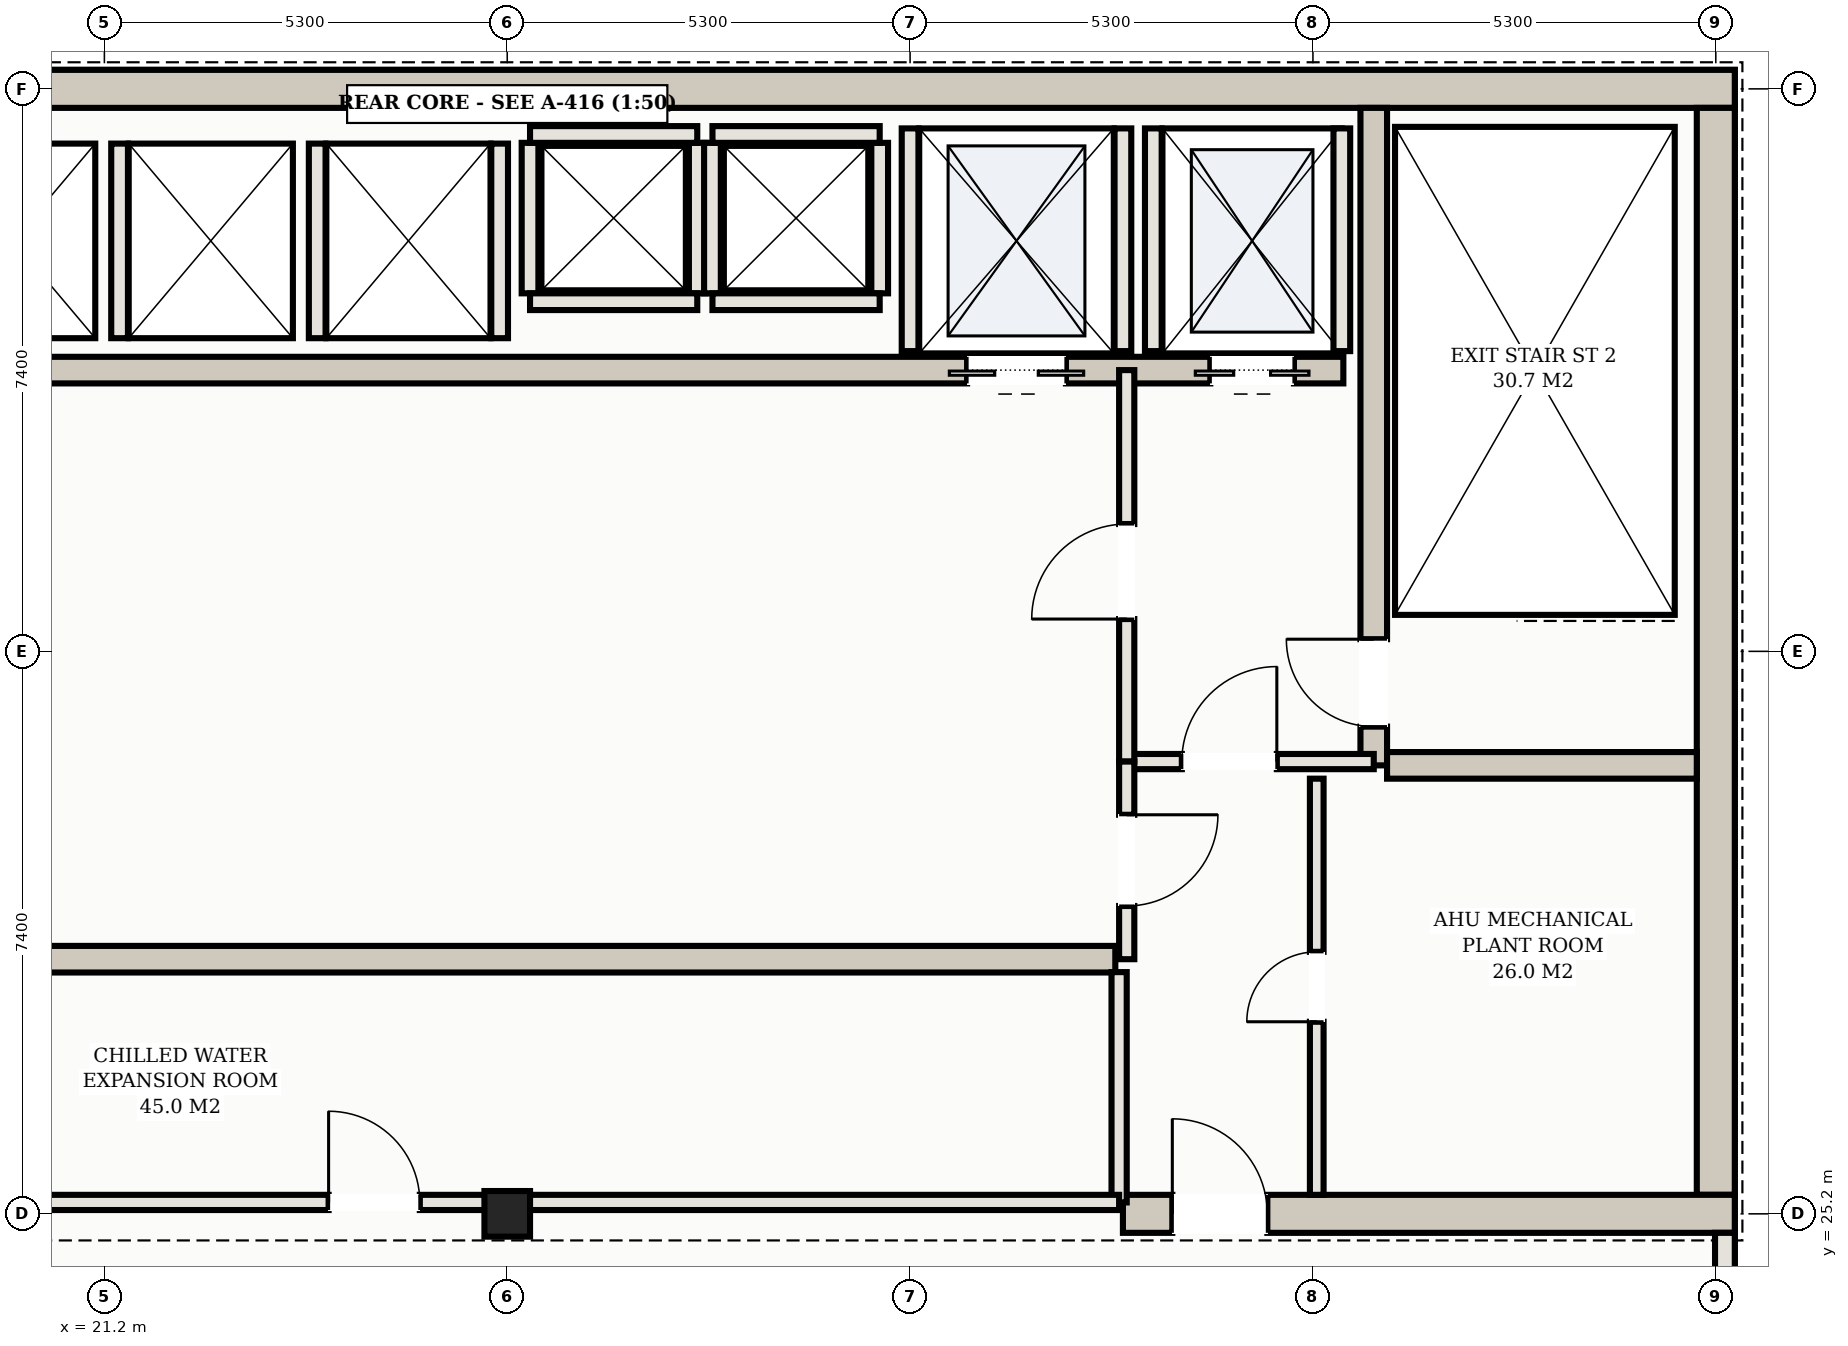
"""IFC4 building model, lengths in metres.
Left out: names, types, materials, properties, quantities, classifications, styles, units other than length and angle.
Written with IfcOpenShell. Run it as: python <this file> out.ifc"""

import sys

from ifc_helpers import new_model, si_unit, direction, frame, frame_2d, origin, origin_2d, place, context, subcontext, project, spatial, rectangle, hollow_rectangle, extrude, element, fill, save


model = new_model("IFC4")
c1 = context("Model", 3, precision=1e-05, world=origin(), true_north=direction((0.0, 1.0)))
c2 = subcontext(c1, "Body", "Model", "MODEL_VIEW")
j1 = project(units=[si_unit("LENGTHUNIT", "METRE"), si_unit("PLANEANGLEUNIT", "RADIAN")], contexts=[c1])
p1 = place(None, origin())
s1 = spatial("IfcSite", under=j1, at=p1, CompositionType="ELEMENT")
p2 = place(p1, origin())
s2 = spatial("IfcBuilding", under=s1, at=p2, CompositionType="ELEMENT")
p3 = place(p2, frame((0.0, 0.0, 270.8)))
s3 = spatial("IfcBuildingStorey", under=s2, at=p3, CompositionType="ELEMENT", Elevation=270.8)
p4 = place(p3, frame((10.35, 40.0, 0.0), z_axis=(0.0, 0.0, 1.0), x_axis=(1.0, 0.0, 0.0)))
e1 = element("IfcWall", 1, at=p4, inside=s3, PredefinedType="SHEAR", context=c2, shape_type="SweptSolid", body=[
    extrude(rectangle(XDim=32.3, YDim=0.5, at=frame_2d((16.15, 0.0))), origin(), (0.0, 0.0, 1.0), 6.177),
])
p5 = place(p3, frame((42.4, 25.45, 0.0), z_axis=(0.0, 0.0, 1.0), x_axis=(0.0, 1.0, 0.0)))
e2 = element("IfcWall", 2, at=p5, inside=s3, PredefinedType="SHEAR", context=c2, shape_type="SweptSolid", body=[
    extrude(rectangle(XDim=14.3, YDim=0.5, at=frame_2d((7.15, 0.0))), origin(), (0.0, 0.0, 1.0), 14.168),
])
p6 = place(p3, frame((34.6, 25.2, 0.0), z_axis=(0.0, 0.0, 1.0), x_axis=(1.0, 0.0, 0.0)))
e3 = element("IfcWall", 3, at=p6, inside=s3, PredefinedType="SHEAR", context=c2, shape_type="SweptSolid", body=[
    extrude(rectangle(XDim=8.05, YDim=0.5, at=frame_2d((4.025, 0.0))), origin(), (0.0, 0.0, 1.0), 12.223),
])
p7 = place(p6, frame((0.65, 0.0, 0.0)))
e4 = element("IfcOpeningElement", 4, at=p7, cuts=e3, PredefinedType="OPENING", context=c2, shape_type="SweptSolid", body=[
    extrude(rectangle(XDim=1.25, YDim=2.2, at=frame_2d((0.625, 1.1))), frame((0.0, 0.26, 0.0), z_axis=(0.0, -1.0, 0.0), x_axis=(1.0, 0.0, 0.0)), (0.0, 0.0, 1.0), 0.52),
])
p8 = place(p3, frame((37.9, 31.1, 0.0), z_axis=(0.0, 0.0, 1.0), x_axis=(0.0, 1.0, 0.0)))
e5 = element("IfcWall", 5, at=p8, inside=s3, PredefinedType="SHEAR", context=c2, shape_type="SweptSolid", body=[
    extrude(rectangle(XDim=8.65, YDim=0.35, at=frame_2d((4.325, 0.0))), origin(), (0.0, 0.0, 1.0), 13.046),
])
p9 = place(p8, frame((0.51, 0.0, 0.0)))
e6 = element("IfcOpeningElement", 6, at=p9, cuts=e5, PredefinedType="OPENING", context=c2, shape_type="SweptSolid", body=[
    extrude(rectangle(XDim=1.15, YDim=2.2, at=frame_2d((0.575, 1.1))), frame((0.0, 0.185, 0.0), z_axis=(0.0, -1.0, 0.0), x_axis=(1.0, 0.0, 0.0)), (0.0, 0.0, 1.0), 0.37),
])
p10 = place(p3, frame((38.075, 31.1, 0.0), z_axis=(0.0, 0.0, 1.0), x_axis=(1.0, 0.0, 0.0)))
e7 = element("IfcWall", 7, at=p10, inside=s3, PredefinedType="SHEAR", context=c2, shape_type="SweptSolid", body=[
    extrude(rectangle(XDim=4.075, YDim=0.35, at=frame_2d((2.038, 0.0))), origin(), (0.0, 0.0, 1.0), 13.09),
])
p11 = place(p3, frame((15.5, 36.3, 0.0), z_axis=(0.0, 0.0, 1.0), x_axis=(1.0, 0.0, 0.0)))
e8 = element("IfcWall", 8, at=p11, inside=s3, PredefinedType="SHEAR", context=c2, shape_type="SweptSolid", body=[
    extrude(rectangle(XDim=22.0, YDim=0.35, at=frame_2d((11.0, 0.0))), origin(), (0.0, 0.0, 1.0), 7.461),
])
p12 = place(p11, frame((0.65, 0.0, 0.0)))
e9 = element("IfcOpeningElement", 9, at=p12, cuts=e8, PredefinedType="OPENING", context=c2, shape_type="SweptSolid", body=[
    extrude(rectangle(XDim=1.1, YDim=2.15, at=frame_2d((0.55, 1.075))), frame((0.0, 0.185, 0.0), z_axis=(0.0, -1.0, 0.0), x_axis=(1.0, 0.0, 0.0)), (0.0, 0.0, 1.0), 0.37),
])
p13 = place(p11, frame((20.25, 0.0, 0.0)))
e10 = element("IfcOpeningElement", 10, at=p13, cuts=e8, PredefinedType="OPENING", context=c2, shape_type="SweptSolid", body=[
    extrude(rectangle(XDim=1.1, YDim=2.15, at=frame_2d((0.55, 1.075))), frame((0.0, 0.185, 0.0), z_axis=(0.0, -1.0, 0.0), x_axis=(1.0, 0.0, 0.0)), (0.0, 0.0, 1.0), 0.37),
])
p14 = place(p11, frame((17.05, 0.0, 0.0)))
e11 = element("IfcOpeningElement", 11, at=p14, cuts=e8, PredefinedType="OPENING", context=c2, shape_type="SweptSolid", body=[
    extrude(rectangle(XDim=1.3, YDim=2.2, at=frame_2d((0.65, 1.1))), frame((0.0, 0.185, 0.0), z_axis=(0.0, -1.0, 0.0), x_axis=(1.0, 0.0, 0.0)), (0.0, 0.0, 1.0), 0.37),
])
p15 = place(p3, frame((18.5, 28.55, 0.0), z_axis=(0.0, 0.0, 1.0), x_axis=(1.0, 0.0, 0.0)))
e12 = element("IfcWall", 12, at=p15, inside=s3, PredefinedType="SHEAR", context=c2, shape_type="SweptSolid", body=[
    extrude(rectangle(XDim=16.0, YDim=0.35, at=frame_2d((8.0, 0.0))), origin(), (0.0, 0.0, 1.0), 8.209),
])
p16 = place(p3, frame((26.5, 25.2, 0.0), z_axis=(0.0, 0.0, 1.0), x_axis=(1.0, 0.0, 0.0)))
e13 = element("IfcColumn", 13, at=p16, inside=s3, PredefinedType="COLUMN", context=c2, shape_type="SweptSolid", body=[
    extrude(hollow_rectangle(XDim=0.6, YDim=0.6, WallThickness=0.022, at=origin_2d()), origin(), (0.0, 0.0, 1.0), 6.0),
])
for number, where, z_axis, x_axis in (
    (14, (35.0, 36.55, 0.0), (0.0, 0.0, 1.0), (0.0, 1.0, 0.0)),
    (15, (37.48, 36.55, 0.0), (0.0, 0.0, 1.0), (0.0, 1.0, 0.0)),
):
    element("IfcWall", number, at=place(p3, frame(where, z_axis=z_axis, x_axis=x_axis)), inside=s3, PredefinedType="SOLIDWALL", context=c2, shape_type="SweptSolid", body=[
        extrude(rectangle(XDim=2.93, YDim=0.22, at=frame_2d((1.465, 0.0))), origin(), (0.0, 0.0, 1.0), 12.262),
    ])
for number, where, z_axis, x_axis in (
    (16, (31.8, 36.55, 0.0), (0.0, 0.0, 1.0), (0.0, 1.0, 0.0)),
    (17, (34.6, 36.55, 0.0), (0.0, 0.0, 1.0), (0.0, 1.0, 0.0)),
):
    element("IfcWall", number, at=place(p3, frame(where, z_axis=z_axis, x_axis=x_axis)), inside=s3, PredefinedType="SOLIDWALL", context=c2, shape_type="SweptSolid", body=[
        extrude(rectangle(XDim=2.93, YDim=0.22, at=frame_2d((1.465, 0.0))), origin(), (0.0, 0.0, 1.0), 11.464),
    ])
p17 = place(p3, frame((21.4, 36.72, 0.0), z_axis=(0.0, 0.0, 1.0), x_axis=(0.0, 1.0, 0.0)))
e18 = element("IfcWall", 18, at=p17, inside=s3, PredefinedType="SOLIDWALL", context=c2, shape_type="SweptSolid", body=[
    extrude(rectangle(XDim=2.56, YDim=0.22, at=frame_2d((1.28, 0.0))), origin(), (0.0, 0.0, 1.0), 8.871),
])
for number, where, z_axis, x_axis in (
    (19, (24.0, 36.72, 0.0), (0.0, 0.0, 1.0), (0.0, 1.0, 0.0)),
    (20, (26.4, 36.72, 0.0), (0.0, 0.0, 1.0), (0.0, 1.0, 0.0)),
):
    element("IfcWall", number, at=place(p3, frame(where, z_axis=z_axis, x_axis=x_axis)), inside=s3, PredefinedType="SOLIDWALL", context=c2, shape_type="SweptSolid", body=[
        extrude(rectangle(XDim=2.56, YDim=0.22, at=frame_2d((1.28, 0.0))), origin(), (0.0, 0.0, 1.0), 9.52),
    ])
for number, where, z_axis, x_axis in (
    (21, (26.8, 37.31, 0.0), (0.0, 0.0, 1.0), (0.0, 1.0, 0.0)),
    (22, (29.0, 37.31, 0.0), (0.0, 0.0, 1.0), (0.0, 1.0, 0.0)),
):
    element("IfcWall", number, at=place(p3, frame(where, z_axis=z_axis, x_axis=x_axis)), inside=s3, PredefinedType="SOLIDWALL", context=c2, shape_type="SweptSolid", body=[
        extrude(rectangle(XDim=1.98, YDim=0.22, at=frame_2d((0.99, 0.0))), origin(), (0.0, 0.0, 1.0), 10.218),
    ])
for number, where, z_axis, x_axis in (
    (23, (26.8, 39.4, 0.0), (0.0, 0.0, 1.0), (1.0, 0.0, 0.0)),
    (24, (26.8, 37.2, 0.0), (0.0, 0.0, 1.0), (1.0, 0.0, 0.0)),
):
    element("IfcWall", number, at=place(p3, frame(where, z_axis=z_axis, x_axis=x_axis)), inside=s3, PredefinedType="SOLIDWALL", context=c2, shape_type="SweptSolid", body=[
        extrude(rectangle(XDim=2.2, YDim=0.22, at=frame_2d((1.1, 0.0))), origin(), (0.0, 0.0, 1.0), 10.218),
    ])
for number, where, z_axis, x_axis in (
    (25, (29.2, 37.31, 0.0), (0.0, 0.0, 1.0), (0.0, 1.0, 0.0)),
    (26, (31.4, 37.31, 0.0), (0.0, 0.0, 1.0), (0.0, 1.0, 0.0)),
):
    element("IfcWall", number, at=place(p3, frame(where, z_axis=z_axis, x_axis=x_axis)), inside=s3, PredefinedType="SOLIDWALL", context=c2, shape_type="SweptSolid", body=[
        extrude(rectangle(XDim=1.98, YDim=0.22, at=frame_2d((0.99, 0.0))), origin(), (0.0, 0.0, 1.0), 10.816),
    ])
for number, where, z_axis, x_axis in (
    (27, (29.2, 39.4, 0.0), (0.0, 0.0, 1.0), (1.0, 0.0, 0.0)),
    (28, (29.2, 37.2, 0.0), (0.0, 0.0, 1.0), (1.0, 0.0, 0.0)),
):
    element("IfcWall", number, at=place(p3, frame(where, z_axis=z_axis, x_axis=x_axis)), inside=s3, PredefinedType="SOLIDWALL", context=c2, shape_type="SweptSolid", body=[
        extrude(rectangle(XDim=2.2, YDim=0.22, at=frame_2d((1.1, 0.0))), origin(), (0.0, 0.0, 1.0), 10.816),
    ])
p18 = place(p3, frame((42.52, 17.06, 0.0), z_axis=(0.0, 0.0, 1.0), x_axis=(0.0, 1.0, 0.0)))
e29 = element("IfcWall", 29, at=p18, inside=s3, PredefinedType="SOLIDWALL", context=c2, shape_type="SweptSolid", body=[
    extrude(rectangle(XDim=7.89, YDim=0.26, at=frame_2d((3.945, 0.0))), origin(), (0.0, 0.0, 1.0), 6.116),
])
p19 = place(p3, frame((34.65, 31.15, 0.0), z_axis=(0.0, 0.0, 1.0), x_axis=(1.0, 0.0, 0.0)))
e30 = element("IfcWall", 30, at=p19, inside=s3, PredefinedType="PARTITIONING", context=c2, shape_type="SweptSolid", body=[
    extrude(rectangle(XDim=3.25, YDim=0.2, at=frame_2d((1.625, 0.0))), origin(), (0.0, 0.0, 1.0), 5.98),
])
p20 = place(p19, frame((0.725, 0.0, 0.0)))
e31 = element("IfcOpeningElement", 31, at=p20, cuts=e30, PredefinedType="OPENING", context=c2, shape_type="SweptSolid", body=[
    extrude(rectangle(XDim=1.25, YDim=2.2, at=frame_2d((0.625, 1.1))), frame((0.0, 0.11, 0.0), z_axis=(0.0, -1.0, 0.0), x_axis=(1.0, 0.0, 0.0)), (0.0, 0.0, 1.0), 0.22),
])
p21 = place(p3, frame((34.65, 31.15, 0.0), z_axis=(0.0, 0.0, 1.0), x_axis=(0.0, 1.0, 0.0)))
e32 = element("IfcWall", 32, at=p21, inside=s3, PredefinedType="PARTITIONING", context=c2, shape_type="SweptSolid", body=[
    extrude(rectangle(XDim=5.15, YDim=0.2, at=frame_2d((2.575, 0.0))), origin(), (0.0, 0.0, 1.0), 5.98),
])
p22 = place(p21, frame((1.875, 0.0, 0.0)))
e33 = element("IfcOpeningElement", 33, at=p22, cuts=e32, PredefinedType="OPENING", context=c2, shape_type="SweptSolid", body=[
    extrude(rectangle(XDim=1.25, YDim=2.2, at=frame_2d((0.625, 1.1))), frame((0.0, 0.11, 0.0), z_axis=(0.0, -1.0, 0.0), x_axis=(1.0, 0.0, 0.0)), (0.0, 0.0, 1.0), 0.22),
])
p23 = place(p3, frame((37.15, 25.45, 0.0), z_axis=(0.0, 0.0, 1.0), x_axis=(0.0, 1.0, 0.0)))
e34 = element("IfcWall", 34, at=p23, inside=s3, PredefinedType="PARTITIONING", context=c2, shape_type="SweptSolid", body=[
    extrude(rectangle(XDim=5.475, YDim=0.18, at=frame_2d((2.738, 0.0))), origin(), (0.0, 0.0, 1.0), 5.98),
])
p24 = place(p23, frame((2.277, 0.0, 0.0)))
e35 = element("IfcOpeningElement", 35, at=p24, cuts=e34, PredefinedType="OPENING", context=c2, shape_type="SweptSolid", body=[
    extrude(rectangle(XDim=0.92, YDim=2.15, at=frame_2d((0.46, 1.075))), frame((0.0, 0.1, 0.0), z_axis=(0.0, -1.0, 0.0), x_axis=(1.0, 0.0, 0.0)), (0.0, 0.0, 1.0), 0.2),
])
p25 = place(p3, frame((34.65, 28.55, 0.0), z_axis=(0.0, 0.0, 1.0), x_axis=(0.0, 1.0, 0.0)))
e36 = element("IfcWall", 36, at=p25, inside=s3, PredefinedType="PARTITIONING", context=c2, shape_type="SweptSolid", body=[
    extrude(rectangle(XDim=2.6, YDim=0.2, at=frame_2d((1.3, 0.0))), origin(), (0.0, 0.0, 1.0), 5.98),
])
p26 = place(p25, frame((0.7, 0.0, 0.0)))
e37 = element("IfcOpeningElement", 37, at=p26, cuts=e36, PredefinedType="OPENING", context=c2, shape_type="SweptSolid", body=[
    extrude(rectangle(XDim=1.2, YDim=2.2, at=frame_2d((0.6, 1.1))), frame((0.0, 0.11, 0.0), z_axis=(0.0, -1.0, 0.0), x_axis=(1.0, 0.0, 0.0)), (0.0, 0.0, 1.0), 0.22),
])
p27 = place(p3, frame((34.55, 25.35, 0.0), z_axis=(0.0, 0.0, 1.0), x_axis=(0.0, 1.0, 0.0)))
e38 = element("IfcWall", 38, at=p27, inside=s3, PredefinedType="PARTITIONING", context=c2, shape_type="SweptSolid", body=[
    extrude(rectangle(XDim=3.03, YDim=0.2, at=frame_2d((1.515, 0.0))), origin(), (0.0, 0.0, 1.0), 3.6),
])
p28 = place(p3, frame((18.45, 25.35, 0.0), z_axis=(0.0, 0.0, 1.0), x_axis=(1.0, 0.0, 0.0)))
e39 = element("IfcWall", 39, at=p28, inside=s3, PredefinedType="PARTITIONING", context=c2, shape_type="SweptSolid", body=[
    extrude(rectangle(XDim=16.1, YDim=0.2, at=frame_2d((8.05, 0.0))), origin(), (0.0, 0.0, 1.0), 3.6),
])
p29 = place(p28, frame((5.7, 0.0, 0.0)))
e40 = element("IfcOpeningElement", 40, at=p29, cuts=e39, PredefinedType="OPENING", context=c2, shape_type="SweptSolid", body=[
    extrude(rectangle(XDim=1.2, YDim=2.2, at=frame_2d((0.6, 1.1))), frame((0.0, 0.11, 0.0), z_axis=(0.0, -1.0, 0.0), x_axis=(1.0, 0.0, 0.0)), (0.0, 0.0, 1.0), 0.22),
])
p30 = place(p13, frame((1.1, 0.0, 0.0), z_axis=(0.0, 0.0, 1.0), x_axis=(-1.0, 0.0, 0.0)))
e41 = element("IfcDoor", 41, at=p30, inside=s3, OperationType="DOUBLE_DOOR_SLIDING", PredefinedType="DOOR", context=c2, shape_type="SweptSolid", body=[
    extrude(rectangle(XDim=1.1, YDim=2.15, at=frame_2d((0.55, 1.075))), frame((0.0, 0.025, 0.0), z_axis=(0.0, -1.0, 0.0), x_axis=(1.0, 0.0, 0.0)), (0.0, 0.0, 1.0), 0.05),
])
fill(e10, e41)
p31 = place(p14, frame((1.3, 0.0, 0.0), z_axis=(0.0, 0.0, 1.0), x_axis=(-1.0, 0.0, 0.0)))
e42 = element("IfcDoor", 42, at=p31, inside=s3, OperationType="DOUBLE_DOOR_SLIDING", PredefinedType="DOOR", context=c2, shape_type="SweptSolid", body=[
    extrude(rectangle(XDim=1.3, YDim=2.2, at=frame_2d((0.65, 1.1))), frame((0.0, 0.025, 0.0), z_axis=(0.0, -1.0, 0.0), x_axis=(1.0, 0.0, 0.0)), (0.0, 0.0, 1.0), 0.05),
])
fill(e11, e42)
p32 = place(p7, origin())
e43 = element("IfcDoor", 43, at=p32, inside=s3, OperationType="SINGLE_SWING_LEFT", PredefinedType="DOOR", context=c2, shape_type="SweptSolid", body=[
    extrude(rectangle(XDim=1.25, YDim=2.2, at=frame_2d((0.625, 1.1))), frame((0.0, 0.025, 0.0), z_axis=(0.0, -1.0, 0.0), x_axis=(1.0, 0.0, 0.0)), (0.0, 0.0, 1.0), 0.05),
])
fill(e4, e43)
p33 = place(p20, origin())
e44 = element("IfcDoor", 44, at=p33, inside=s3, OperationType="SINGLE_SWING_RIGHT", PredefinedType="DOOR", context=c2, shape_type="SweptSolid", body=[
    extrude(rectangle(XDim=1.25, YDim=2.2, at=frame_2d((0.625, 1.1))), frame((0.0, 0.025, 0.0), z_axis=(0.0, -1.0, 0.0), x_axis=(1.0, 0.0, 0.0)), (0.0, 0.0, 1.0), 0.05),
])
fill(e31, e44)
p34 = place(p22, origin())
e45 = element("IfcDoor", 45, at=p34, inside=s3, OperationType="SINGLE_SWING_LEFT", PredefinedType="DOOR", context=c2, shape_type="SweptSolid", body=[
    extrude(rectangle(XDim=1.25, YDim=2.2, at=frame_2d((0.625, 1.1))), frame((0.0, 0.025, 0.0), z_axis=(0.0, -1.0, 0.0), x_axis=(1.0, 0.0, 0.0)), (0.0, 0.0, 1.0), 0.05),
])
fill(e33, e45)
p35 = place(p9, origin())
e46 = element("IfcDoor", 46, at=p35, inside=s3, OperationType="SINGLE_SWING_RIGHT", PredefinedType="DOOR", context=c2, shape_type="SweptSolid", body=[
    extrude(rectangle(XDim=1.15, YDim=2.2, at=frame_2d((0.575, 1.1))), frame((0.0, 0.025, 0.0), z_axis=(0.0, -1.0, 0.0), x_axis=(1.0, 0.0, 0.0)), (0.0, 0.0, 1.0), 0.05),
])
fill(e6, e46)
p36 = place(p24, origin())
e47 = element("IfcDoor", 47, at=p36, inside=s3, OperationType="SINGLE_SWING_LEFT", PredefinedType="DOOR", context=c2, shape_type="SweptSolid", body=[
    extrude(rectangle(XDim=0.92, YDim=2.15, at=frame_2d((0.46, 1.075))), frame((0.0, 0.025, 0.0), z_axis=(0.0, -1.0, 0.0), x_axis=(1.0, 0.0, 0.0)), (0.0, 0.0, 1.0), 0.05),
])
fill(e35, e47)
p37 = place(p26, frame((1.2, 0.0, 0.0), z_axis=(0.0, 0.0, 1.0), x_axis=(-1.0, 0.0, 0.0)))
e48 = element("IfcDoor", 48, at=p37, inside=s3, OperationType="SINGLE_SWING_LEFT", PredefinedType="DOOR", context=c2, shape_type="SweptSolid", body=[
    extrude(rectangle(XDim=1.2, YDim=2.2, at=frame_2d((0.6, 1.1))), frame((0.0, 0.025, 0.0), z_axis=(0.0, -1.0, 0.0), x_axis=(1.0, 0.0, 0.0)), (0.0, 0.0, 1.0), 0.05),
])
fill(e37, e48)
p38 = place(p29, origin())
e49 = element("IfcDoor", 49, at=p38, inside=s3, OperationType="SINGLE_SWING_LEFT", PredefinedType="DOOR", context=c2, shape_type="SweptSolid", body=[
    extrude(rectangle(XDim=1.2, YDim=2.2, at=frame_2d((0.6, 1.1))), frame((0.0, 0.025, 0.0), z_axis=(0.0, -1.0, 0.0), x_axis=(1.0, 0.0, 0.0)), (0.0, 0.0, 1.0), 0.05),
])
fill(e40, e49)
save(model, sys.argv[1])
